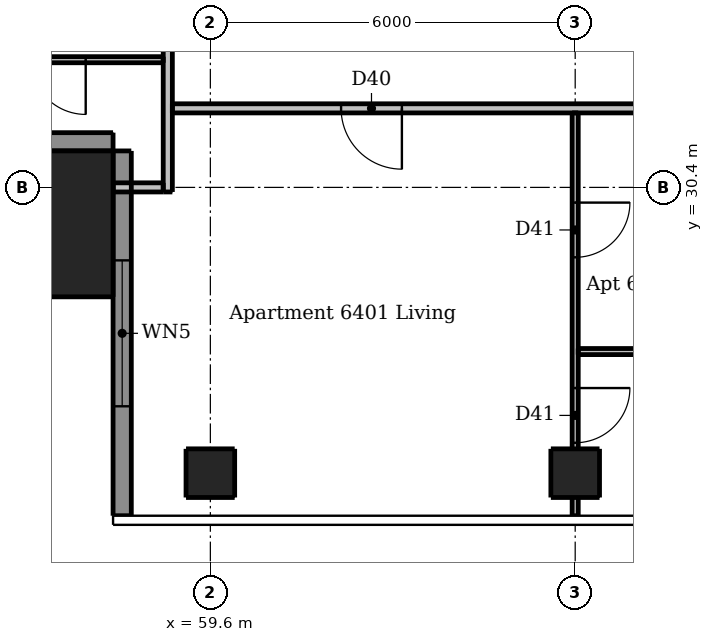
"""IFC4 building model, lengths in metres.
Left out: names, types, materials, properties, quantities, classifications, styles, units other than length and angle.
Written with IfcOpenShell. Run it as: python <this file> out.ifc"""

import sys

from ifc_helpers import new_model, si_unit, direction, frame, frame_2d, origin, origin_2d, place, context, subcontext, project, spatial, rectangle, extrude, element, fill, save


model = new_model("IFC4")
c1 = context("Model", 3, precision=1e-05, world=origin(), true_north=direction((0.0, 1.0)))
c2 = subcontext(c1, "Body", "Model", "MODEL_VIEW")
j1 = project(units=[si_unit("LENGTHUNIT", "METRE"), si_unit("PLANEANGLEUNIT", "RADIAN")], contexts=[c1])
p1 = place(None, origin())
s1 = spatial("IfcSite", under=j1, at=p1, CompositionType="ELEMENT")
p2 = place(p1, origin())
s2 = spatial("IfcBuilding", under=s1, at=p2, CompositionType="ELEMENT")
p3 = place(p2, frame((0.0, 0.0, 242.2)))
s3 = spatial("IfcBuildingStorey", under=s2, at=p3, CompositionType="ELEMENT", Elevation=242.2)
for number, where, z_axis, x_axis in (
    (1, (59.6, 25.7, 0.0), (0.0, 0.0, 1.0), (1.0, 0.0, 0.0)),
    (2, (65.6, 25.7, 0.0), (0.0, 0.0, 1.0), (1.0, 0.0, 0.0)),
):
    element("IfcColumn", number, at=place(p3, frame(where, z_axis=z_axis, x_axis=x_axis)), inside=s3, PredefinedType="COLUMN", context=c2, shape_type="SweptSolid", body=[
        extrude(rectangle(XDim=0.8, YDim=0.8, at=origin_2d()), origin(), (0.0, 0.0, 1.0), 3.05),
    ])
p4 = place(p3, frame((56.8, 29.8, 0.0), z_axis=(0.0, 0.0, 1.0), x_axis=(1.0, 0.0, 0.0)))
e3 = element("IfcColumn", 3, at=p4, inside=s3, PredefinedType="COLUMN", context=c2, shape_type="SweptSolid", body=[
    extrude(rectangle(XDim=2.4, YDim=2.4, at=origin_2d()), origin(), (0.0, 0.0, 1.0), 3.3),
])
p5 = place(p3, frame((53.0, 31.15, 0.0), z_axis=(0.0, 0.0, 1.0), x_axis=(1.0, 0.0, 0.0)))
e4 = element("IfcWall", 4, at=p5, inside=s3, PredefinedType="SOLIDWALL", context=c2, shape_type="SweptSolid", body=[
    extrude(rectangle(XDim=5.0, YDim=0.3, at=frame_2d((2.5, 0.0))), origin(), (0.0, 0.0, 1.0), 3.05),
])
p6 = place(p3, frame((58.15, 31.0, 0.0), z_axis=(0.0, 0.0, 1.0), x_axis=(0.0, -1.0, 0.0)))
e5 = element("IfcWall", 5, at=p6, inside=s3, PredefinedType="SOLIDWALL", context=c2, shape_type="SweptSolid", body=[
    extrude(rectangle(XDim=6.0, YDim=0.3, at=frame_2d((3.0, 0.0))), origin(), (0.0, 0.0, 1.0), 3.05),
])
p7 = place(p6, frame((1.8, 0.0, 0.15)))
e6 = element("IfcOpeningElement", 6, at=p7, cuts=e5, PredefinedType="OPENING", context=c2, shape_type="SweptSolid", body=[
    extrude(rectangle(XDim=2.4, YDim=2.1, at=frame_2d((1.2, 1.05))), frame((0.0, 0.16, 0.0), z_axis=(0.0, -1.0, 0.0), x_axis=(1.0, 0.0, 0.0)), (0.0, 0.0, 1.0), 0.32),
])
p8 = place(p3, frame((65.6, 31.625, 0.0), z_axis=(0.0, 0.0, 1.0), x_axis=(0.0, -1.0, 0.0)))
e7 = element("IfcWall", 7, at=p8, inside=s3, PredefinedType="PARTITIONING", context=c2, shape_type="SweptSolid", body=[
    extrude(rectangle(XDim=6.625, YDim=0.1, at=frame_2d((3.312, 0.0))), origin(), (0.0, 0.0, 1.0), 2.59),
])
p9 = place(p8, frame((1.475, 0.0, 0.0)))
e8 = element("IfcOpeningElement", 8, at=p9, cuts=e7, PredefinedType="OPENING", context=c2, shape_type="SweptSolid", body=[
    extrude(rectangle(XDim=0.9, YDim=2.1, at=frame_2d((0.45, 1.05))), frame((0.0, 0.06, 0.0), z_axis=(0.0, -1.0, 0.0), x_axis=(1.0, 0.0, 0.0)), (0.0, 0.0, 1.0), 0.12),
])
p10 = place(p8, frame((4.525, 0.0, 0.0)))
e9 = element("IfcOpeningElement", 9, at=p10, cuts=e7, PredefinedType="OPENING", context=c2, shape_type="SweptSolid", body=[
    extrude(rectangle(XDim=0.9, YDim=2.1, at=frame_2d((0.45, 1.05))), frame((0.0, 0.06, 0.0), z_axis=(0.0, -1.0, 0.0), x_axis=(1.0, 0.0, 0.0)), (0.0, 0.0, 1.0), 0.12),
])
p11 = place(p3, frame((58.825, 32.5, 0.0), z_axis=(0.0, 0.0, 1.0), x_axis=(-1.0, 0.0, 0.0)))
e10 = element("IfcWall", 10, at=p11, inside=s3, PredefinedType="PARTITIONING", context=c2, shape_type="SweptSolid", body=[
    extrude(rectangle(XDim=3.475, YDim=0.1, at=frame_2d((1.737, 0.0))), origin(), (0.0, 0.0, 1.0), 3.05),
])
p12 = place(p11, frame((1.275, 0.0, 0.0)))
e11 = element("IfcOpeningElement", 11, at=p12, cuts=e10, PredefinedType="OPENING", context=c2, shape_type="SweptSolid", body=[
    extrude(rectangle(XDim=0.9, YDim=2.1, at=frame_2d((0.45, 1.05))), frame((0.0, 0.06, 0.0), z_axis=(0.0, -1.0, 0.0), x_axis=(1.0, 0.0, 0.0)), (0.0, 0.0, 1.0), 0.12),
])
p13 = place(p3, frame((65.65, 27.7, 0.0), z_axis=(0.0, 0.0, 1.0), x_axis=(1.0, 0.0, 0.0)))
e12 = element("IfcWall", 12, at=p13, inside=s3, PredefinedType="PARTITIONING", context=c2, shape_type="SweptSolid", body=[
    extrude(rectangle(XDim=5.875, YDim=0.1, at=frame_2d((2.938, 0.0))), origin(), (0.0, 0.0, 1.0), 3.05),
])
p14 = place(p13, frame((3.75, 0.0, 0.0)))
e13 = element("IfcOpeningElement", 13, at=p14, cuts=e12, PredefinedType="OPENING", context=c2, shape_type="SweptSolid", body=[
    extrude(rectangle(XDim=0.8, YDim=2.1, at=frame_2d((0.4, 1.05))), frame((0.0, 0.06, 0.0), z_axis=(0.0, -1.0, 0.0), x_axis=(1.0, 0.0, 0.0)), (0.0, 0.0, 1.0), 0.12),
])
p15 = place(p3, frame((58.9, 30.325, 0.0), z_axis=(0.0, 0.0, 1.0), x_axis=(0.0, 1.0, 0.0)))
e14 = element("IfcWall", 14, at=p15, inside=s3, PredefinedType="PARTITIONING", context=c2, shape_type="SweptSolid", body=[
    extrude(rectangle(XDim=30.85, YDim=0.15, at=frame_2d((15.425, 0.0))), origin(), (0.0, 0.0, 1.0), 3.05),
])
p16 = place(p15, frame((2.575, 0.0, 0.0)))
e15 = element("IfcOpeningElement", 15, at=p16, cuts=e14, PredefinedType="OPENING", context=c2, shape_type="SweptSolid", body=[
    extrude(rectangle(XDim=1.0, YDim=2.1, at=frame_2d((0.5, 1.05))), frame((0.0, 0.085, 0.0), z_axis=(0.0, -1.0, 0.0), x_axis=(1.0, 0.0, 0.0)), (0.0, 0.0, 1.0), 0.17),
])
p17 = place(p15, frame((8.575, 0.0, 0.0)))
e16 = element("IfcOpeningElement", 16, at=p17, cuts=e14, PredefinedType="OPENING", context=c2, shape_type="SweptSolid", body=[
    extrude(rectangle(XDim=1.0, YDim=2.1, at=frame_2d((0.5, 1.05))), frame((0.0, 0.085, 0.0), z_axis=(0.0, -1.0, 0.0), x_axis=(1.0, 0.0, 0.0)), (0.0, 0.0, 1.0), 0.17),
])
p18 = place(p15, frame((14.575, 0.0, 0.0)))
e17 = element("IfcOpeningElement", 17, at=p18, cuts=e14, PredefinedType="OPENING", context=c2, shape_type="SweptSolid", body=[
    extrude(rectangle(XDim=1.0, YDim=2.1, at=frame_2d((0.5, 1.05))), frame((0.0, 0.085, 0.0), z_axis=(0.0, -1.0, 0.0), x_axis=(1.0, 0.0, 0.0)), (0.0, 0.0, 1.0), 0.17),
])
p19 = place(p15, frame((26.925, 0.0, 0.0)))
e18 = element("IfcOpeningElement", 18, at=p19, cuts=e14, PredefinedType="OPENING", context=c2, shape_type="SweptSolid", body=[
    extrude(rectangle(XDim=1.0, YDim=2.1, at=frame_2d((0.5, 1.05))), frame((0.0, 0.085, 0.0), z_axis=(0.0, -1.0, 0.0), x_axis=(1.0, 0.0, 0.0)), (0.0, 0.0, 1.0), 0.17),
])
p20 = place(p3, frame((89.525, 31.7, 0.0), z_axis=(0.0, 0.0, 1.0), x_axis=(-1.0, 0.0, 0.0)))
e19 = element("IfcWall", 19, at=p20, inside=s3, PredefinedType="PARTITIONING", context=c2, shape_type="SweptSolid", body=[
    extrude(rectangle(XDim=30.55, YDim=0.15, at=frame_2d((15.275, 0.0))), origin(), (0.0, 0.0, 1.0), 3.05),
])
p21 = place(p20, frame((26.775, 0.0, 0.0)))
e20 = element("IfcOpeningElement", 20, at=p21, cuts=e19, PredefinedType="OPENING", context=c2, shape_type="SweptSolid", body=[
    extrude(rectangle(XDim=1.0, YDim=2.1, at=frame_2d((0.5, 1.05))), frame((0.0, 0.085, 0.0), z_axis=(0.0, -1.0, 0.0), x_axis=(1.0, 0.0, 0.0)), (0.0, 0.0, 1.0), 0.17),
])
p22 = place(p20, frame((14.425, 0.0, 0.0)))
e21 = element("IfcOpeningElement", 21, at=p22, cuts=e19, PredefinedType="OPENING", context=c2, shape_type="SweptSolid", body=[
    extrude(rectangle(XDim=1.0, YDim=2.1, at=frame_2d((0.5, 1.05))), frame((0.0, 0.085, 0.0), z_axis=(0.0, -1.0, 0.0), x_axis=(1.0, 0.0, 0.0)), (0.0, 0.0, 1.0), 0.17),
])
p23 = place(p20, frame((6.962, 0.0, 0.0)))
e22 = element("IfcOpeningElement", 22, at=p23, cuts=e19, PredefinedType="OPENING", context=c2, shape_type="SweptSolid", body=[
    extrude(rectangle(XDim=1.0, YDim=2.1, at=frame_2d((0.5, 1.05))), frame((0.0, 0.085, 0.0), z_axis=(0.0, -1.0, 0.0), x_axis=(1.0, 0.0, 0.0)), (0.0, 0.0, 1.0), 0.17),
])
p24 = place(p3, frame((58.0, 30.4, 0.0), z_axis=(0.0, 0.0, 1.0), x_axis=(1.0, 0.0, 0.0)))
e23 = element("IfcWall", 23, at=p24, inside=s3, PredefinedType="PARTITIONING", context=c2, shape_type="SweptSolid", body=[
    extrude(rectangle(XDim=0.825, YDim=0.15, at=frame_2d((0.413, 0.0))), origin(), (0.0, 0.0, 1.0), 3.05),
])
p25 = place(p7, origin())
e24 = element("IfcWindow", 24, at=p25, inside=s3, PartitioningType="DOUBLE_PANEL_VERTICAL", PredefinedType="WINDOW", context=c2, shape_type="SweptSolid", body=[
    extrude(rectangle(XDim=2.4, YDim=2.1, at=frame_2d((1.2, 1.05))), frame((0.0, 0.03, 0.0), z_axis=(0.0, -1.0, 0.0), x_axis=(1.0, 0.0, 0.0)), (0.0, 0.0, 1.0), 0.06),
])
fill(e6, e24)
p26 = place(p21, origin())
e25 = element("IfcDoor", 25, at=p26, inside=s3, OperationType="SINGLE_SWING_LEFT", PredefinedType="DOOR", context=c2, shape_type="SweptSolid", body=[
    extrude(rectangle(XDim=1.0, YDim=2.1, at=frame_2d((0.5, 1.05))), frame((0.0, 0.025, 0.0), z_axis=(0.0, -1.0, 0.0), x_axis=(1.0, 0.0, 0.0)), (0.0, 0.0, 1.0), 0.05),
])
fill(e20, e25)
p27 = place(p9, origin())
e26 = element("IfcDoor", 26, at=p27, inside=s3, OperationType="SINGLE_SWING_LEFT", PredefinedType="DOOR", context=c2, shape_type="SweptSolid", body=[
    extrude(rectangle(XDim=0.9, YDim=2.1, at=frame_2d((0.45, 1.05))), frame((0.0, 0.025, 0.0), z_axis=(0.0, -1.0, 0.0), x_axis=(1.0, 0.0, 0.0)), (0.0, 0.0, 1.0), 0.05),
])
fill(e8, e26)
p28 = place(p10, origin())
e27 = element("IfcDoor", 27, at=p28, inside=s3, OperationType="SINGLE_SWING_LEFT", PredefinedType="DOOR", context=c2, shape_type="SweptSolid", body=[
    extrude(rectangle(XDim=0.9, YDim=2.1, at=frame_2d((0.45, 1.05))), frame((0.0, 0.025, 0.0), z_axis=(0.0, -1.0, 0.0), x_axis=(1.0, 0.0, 0.0)), (0.0, 0.0, 1.0), 0.05),
])
fill(e9, e27)
p29 = place(p12, origin())
e28 = element("IfcDoor", 28, at=p29, inside=s3, OperationType="SINGLE_SWING_LEFT", PredefinedType="DOOR", context=c2, shape_type="SweptSolid", body=[
    extrude(rectangle(XDim=0.9, YDim=2.1, at=frame_2d((0.45, 1.05))), frame((0.0, 0.025, 0.0), z_axis=(0.0, -1.0, 0.0), x_axis=(1.0, 0.0, 0.0)), (0.0, 0.0, 1.0), 0.05),
])
fill(e11, e28)
save(model, sys.argv[1])
